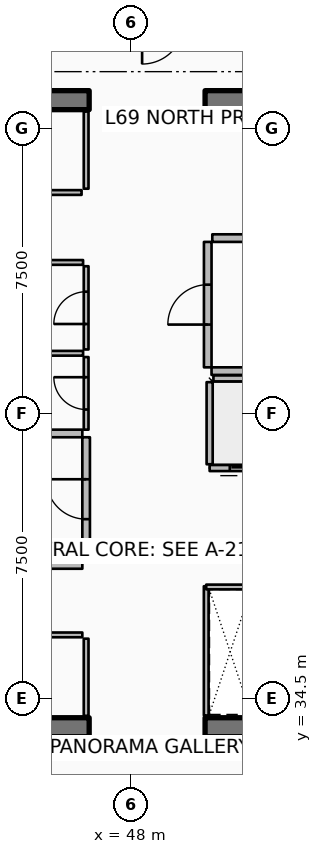
"""IFC4 building model, lengths in metres.
Left out: names, types, materials, properties, quantities, classifications, styles, units other than length and angle.
Written with IfcOpenShell. Run it as: python <this file> out.ifc"""

import sys

from ifc_helpers import new_model, si_unit, direction, frame, frame_2d, origin, place, context, subcontext, project, spatial, rectangle, extrude, element, fill, save


model = new_model("IFC4")
c1 = context("Model", 3, precision=1e-05, world=origin(), true_north=direction((0.0, 1.0)))
c2 = subcontext(c1, "Body", "Model", "MODEL_VIEW")
j1 = project(units=[si_unit("LENGTHUNIT", "METRE"), si_unit("PLANEANGLEUNIT", "RADIAN")], contexts=[c1])
p1 = place(None, origin())
s1 = spatial("IfcSite", under=j1, at=p1, CompositionType="ELEMENT")
p2 = place(p1, origin())
s2 = spatial("IfcBuilding", under=s1, at=p2, CompositionType="ELEMENT")
p3 = place(p2, frame((0.0, 0.0, 275.2)))
s3 = spatial("IfcBuildingStorey", under=s2, at=p3, CompositionType="ELEMENT", Elevation=275.2)
p4 = place(p3, frame((37.3, 33.75, 0.0), z_axis=(0.0, 0.0, 1.0), x_axis=(1.0, 0.0, 0.0)))
e1 = element("IfcWall", 1, at=p4, inside=s3, PredefinedType="SHEAR", context=c2, shape_type="SweptSolid", body=[
    extrude(rectangle(XDim=9.6, YDim=0.5, at=frame_2d((4.8, 0.0))), origin(), (0.0, 0.0, 1.0), 3.85),
])
p5 = place(p3, frame((49.95, 33.75, 0.0), z_axis=(0.0, 0.0, 1.0), x_axis=(1.0, 0.0, 0.0)))
e2 = element("IfcWall", 2, at=p5, inside=s3, PredefinedType="SHEAR", context=c2, shape_type="SweptSolid", body=[
    extrude(rectangle(XDim=9.6, YDim=0.5, at=frame_2d((4.8, 0.0))), origin(), (0.0, 0.0, 1.0), 3.85),
])
p6 = place(p3, frame((37.3, 50.25, 0.0), z_axis=(0.0, 0.0, 1.0), x_axis=(1.0, 0.0, 0.0)))
e3 = element("IfcWall", 3, at=p6, inside=s3, PredefinedType="SHEAR", context=c2, shape_type="SweptSolid", body=[
    extrude(rectangle(XDim=9.6, YDim=0.5, at=frame_2d((4.8, 0.0))), origin(), (0.0, 0.0, 1.0), 3.85),
])
p7 = place(p3, frame((49.95, 50.25, 0.0), z_axis=(0.0, 0.0, 1.0), x_axis=(1.0, 0.0, 0.0)))
e4 = element("IfcWall", 4, at=p7, inside=s3, PredefinedType="SHEAR", context=c2, shape_type="SweptSolid", body=[
    extrude(rectangle(XDim=9.6, YDim=0.5, at=frame_2d((4.8, 0.0))), origin(), (0.0, 0.0, 1.0), 3.85),
])
p8 = place(p3, frame((52.23, 40.57, 0.0), z_axis=(0.0, 0.0, 1.0), x_axis=(-1.0, 0.0, 0.0)))
e5 = element("IfcWall", 5, at=p8, inside=s3, PredefinedType="PARTITIONING", context=c2, shape_type="SweptSolid", body=[
    extrude(rectangle(XDim=2.16, YDim=0.16, at=frame_2d((1.08, 0.0))), origin(), (0.0, 0.0, 1.0), 3.59),
])
p9 = place(p8, frame((0.53, 0.0, 0.0)))
e6 = element("IfcOpeningElement", 6, at=p9, cuts=e5, PredefinedType="OPENING", context=c2, shape_type="SweptSolid", body=[
    extrude(rectangle(XDim=1.1, YDim=2.1, at=frame_2d((0.55, 1.05))), frame((0.0, 0.09, 0.0), z_axis=(0.0, -1.0, 0.0), x_axis=(1.0, 0.0, 0.0)), (0.0, 0.0, 1.0), 0.18),
])
p10 = place(p3, frame((50.07, 40.67, 0.0), z_axis=(0.0, 0.0, 1.0), x_axis=(0.0, 1.0, 0.0)))
e7 = element("IfcWall", 7, at=p10, inside=s3, PredefinedType="PARTITIONING", context=c2, shape_type="SweptSolid", body=[
    extrude(rectangle(XDim=2.16, YDim=0.16, at=frame_2d((1.08, 0.0))), origin(), (0.0, 0.0, 1.0), 3.59),
])
p11 = place(p3, frame((50.17, 42.93, 0.0), z_axis=(0.0, 0.0, 1.0), x_axis=(1.0, 0.0, 0.0)))
e8 = element("IfcWall", 8, at=p11, inside=s3, PredefinedType="PARTITIONING", context=c2, shape_type="SweptSolid", body=[
    extrude(rectangle(XDim=1.96, YDim=0.16, at=frame_2d((0.98, 0.0))), origin(), (0.0, 0.0, 1.0), 3.59),
])
p12 = place(p3, frame((46.82, 34.05, 0.0), z_axis=(0.0, 0.0, 1.0), x_axis=(0.0, 1.0, 0.0)))
e9 = element("IfcWall", 9, at=p12, inside=s3, PredefinedType="PARTITIONING", context=c2, shape_type="SweptSolid", body=[
    extrude(rectangle(XDim=2.03, YDim=0.125, at=frame_2d((1.015, 0.0))), origin(), (0.0, 0.0, 1.0), 3.03),
])
p13 = place(p3, frame((42.6, 36.18, 0.0), z_axis=(0.0, 0.0, 1.0), x_axis=(1.0, 0.0, 0.0)))
e10 = element("IfcWall", 10, at=p13, inside=s3, PredefinedType="PARTITIONING", context=c2, shape_type="SweptSolid", body=[
    extrude(rectangle(XDim=4.12, YDim=0.125, at=frame_2d((2.06, 0.0))), origin(), (0.0, 0.0, 1.0), 3.03),
])
p14 = place(p13, frame((1.635, 0.0, 0.0)))
e11 = element("IfcOpeningElement", 11, at=p14, cuts=e10, PredefinedType="OPENING", context=c2, shape_type="SweptSolid", body=[
    extrude(rectangle(XDim=0.85, YDim=2.06, at=frame_2d((0.425, 1.03))), frame((0.0, 0.073, 0.0), z_axis=(0.0, -1.0, 0.0), x_axis=(1.0, 0.0, 0.0)), (0.0, 0.0, 1.0), 0.145),
])
p15 = place(p3, frame((46.82, 47.92, 0.0), z_axis=(0.0, 0.0, 1.0), x_axis=(0.0, 1.0, 0.0)))
e12 = element("IfcWall", 12, at=p15, inside=s3, PredefinedType="PARTITIONING", context=c2, shape_type="SweptSolid", body=[
    extrude(rectangle(XDim=2.03, YDim=0.125, at=frame_2d((1.015, 0.0))), origin(), (0.0, 0.0, 1.0), 3.03),
])
p16 = place(p3, frame((37.92, 47.82, 0.0), z_axis=(0.0, 0.0, 1.0), x_axis=(1.0, 0.0, 0.0)))
e13 = element("IfcWall", 13, at=p16, inside=s3, PredefinedType="PARTITIONING", context=c2, shape_type="SweptSolid", body=[
    extrude(rectangle(XDim=8.78, YDim=0.125, at=frame_2d((4.39, 0.0))), origin(), (0.0, 0.0, 1.0), 3.03),
])
p17 = place(p16, frame((3.965, 0.0, 0.0)))
e14 = element("IfcOpeningElement", 14, at=p17, cuts=e13, PredefinedType="OPENING", context=c2, shape_type="SweptSolid", body=[
    extrude(rectangle(XDim=0.85, YDim=2.06, at=frame_2d((0.425, 1.03))), frame((0.0, 0.073, 0.0), z_axis=(0.0, -1.0, 0.0), x_axis=(1.0, 0.0, 0.0)), (0.0, 0.0, 1.0), 0.145),
])
p18 = place(p3, frame((41.35, 38.02, 0.0), z_axis=(0.0, 0.0, 1.0), x_axis=(1.0, 0.0, 0.0)))
e15 = element("IfcWall", 15, at=p18, inside=s3, PredefinedType="PARTITIONING", context=c2, shape_type="SweptSolid", body=[
    extrude(rectangle(XDim=5.37, YDim=0.2, at=frame_2d((2.685, 0.0))), origin(), (0.0, 0.0, 1.0), 3.59),
])
p19 = place(p3, frame((43.92, 41.48, 0.0), z_axis=(0.0, 0.0, 1.0), x_axis=(1.0, 0.0, 0.0)))
e16 = element("IfcWall", 16, at=p19, inside=s3, PredefinedType="PARTITIONING", context=c2, shape_type="SweptSolid", body=[
    extrude(rectangle(XDim=2.8, YDim=0.2, at=frame_2d((1.4, 0.0))), origin(), (0.0, 0.0, 1.0), 3.59),
])
p20 = place(p3, frame((46.82, 38.12, 0.0), z_axis=(0.0, 0.0, 1.0), x_axis=(0.0, 1.0, 0.0)))
e17 = element("IfcWall", 17, at=p20, inside=s3, PredefinedType="PARTITIONING", context=c2, shape_type="SweptSolid", body=[
    extrude(rectangle(XDim=3.26, YDim=0.2, at=frame_2d((1.63, 0.0))), origin(), (0.0, 0.0, 1.0), 3.59),
])
p21 = place(p20, frame((1.105, 0.0, 0.0)))
e18 = element("IfcOpeningElement", 18, at=p21, cuts=e17, PredefinedType="OPENING", context=c2, shape_type="SweptSolid", body=[
    extrude(rectangle(XDim=1.05, YDim=2.1, at=frame_2d((0.525, 1.05))), frame((0.0, 0.11, 0.0), z_axis=(0.0, -1.0, 0.0), x_axis=(1.0, 0.0, 0.0)), (0.0, 0.0, 1.0), 0.22),
])
p22 = place(p3, frame((50.12, 43.12, 0.0), z_axis=(0.0, 0.0, 1.0), x_axis=(1.0, 0.0, 0.0)))
e19 = element("IfcWall", 19, at=p22, inside=s3, PredefinedType="PARTITIONING", context=c2, shape_type="SweptSolid", body=[
    extrude(rectangle(XDim=8.88, YDim=0.2, at=frame_2d((4.44, 0.0))), origin(), (0.0, 0.0, 1.0), 3.59),
])
p23 = place(p3, frame((50.14, 46.62, 0.0), z_axis=(0.0, 0.0, 1.0), x_axis=(1.0, 0.0, 0.0)))
e20 = element("IfcWall", 20, at=p23, inside=s3, PredefinedType="PARTITIONING", context=c2, shape_type="SweptSolid", body=[
    extrude(rectangle(XDim=1.02, YDim=0.2, at=frame_2d((0.51, 0.0))), origin(), (0.0, 0.0, 1.0), 3.59),
])
p24 = place(p3, frame((50.02, 43.22, 0.0), z_axis=(0.0, 0.0, 1.0), x_axis=(0.0, 1.0, 0.0)))
e21 = element("IfcWall", 21, at=p24, inside=s3, PredefinedType="PARTITIONING", context=c2, shape_type="SweptSolid", body=[
    extrude(rectangle(XDim=3.3, YDim=0.2, at=frame_2d((1.65, 0.0))), origin(), (0.0, 0.0, 1.0), 3.59),
])
p25 = place(p24, frame((1.125, 0.0, 0.0)))
e22 = element("IfcOpeningElement", 22, at=p25, cuts=e21, PredefinedType="OPENING", context=c2, shape_type="SweptSolid", body=[
    extrude(rectangle(XDim=1.05, YDim=2.1, at=frame_2d((0.525, 1.05))), frame((0.0, 0.11, 0.0), z_axis=(0.0, -1.0, 0.0), x_axis=(1.0, 0.0, 0.0)), (0.0, 0.0, 1.0), 0.22),
])
p26 = place(p3, frame((49.98, 34.06, 0.0), z_axis=(0.0, 0.0, 1.0), x_axis=(0.0, 1.0, 0.0)))
e23 = element("IfcWall", 23, at=p26, inside=s3, PredefinedType="PARTITIONING", context=c2, shape_type="SweptSolid", body=[
    extrude(rectangle(XDim=3.4, YDim=0.125, at=frame_2d((1.7, 0.0))), origin(), (0.0, 0.0, 1.0), 3.03),
])
p27 = place(p3, frame((49.98, 37.44, 0.0), z_axis=(0.0, 0.0, 1.0), x_axis=(1.0, 0.0, 0.0)))
e24 = element("IfcWall", 24, at=p27, inside=s3, PredefinedType="PARTITIONING", context=c2, shape_type="SweptSolid", body=[
    extrude(rectangle(XDim=1.26, YDim=0.125, at=frame_2d((0.63, 0.0))), origin(), (0.0, 0.0, 1.0), 3.03),
])
p28 = place(p3, frame((44.03, 43.59, 0.0), z_axis=(0.0, 0.0, 1.0), x_axis=(1.0, 0.0, 0.0)))
e25 = element("IfcWall", 25, at=p28, inside=s3, PredefinedType="PARTITIONING", context=c2, shape_type="SweptSolid", body=[
    extrude(rectangle(XDim=2.71, YDim=0.125, at=frame_2d((1.355, 0.0))), origin(), (0.0, 0.0, 1.0), 3.03),
])
p29 = place(p3, frame((46.82, 41.58, 0.0), z_axis=(0.0, 0.0, 1.0), x_axis=(0.0, 1.0, 0.0)))
e26 = element("IfcWall", 26, at=p29, inside=s3, PredefinedType="PARTITIONING", context=c2, shape_type="SweptSolid", body=[
    extrude(rectangle(XDim=1.91, YDim=0.125, at=frame_2d((0.955, 0.0))), origin(), (0.0, 0.0, 1.0), 3.03),
])
p30 = place(p29, frame((0.53, 0.0, 0.0)))
e27 = element("IfcOpeningElement", 27, at=p30, cuts=e26, PredefinedType="OPENING", context=c2, shape_type="SweptSolid", body=[
    extrude(rectangle(XDim=0.85, YDim=2.06, at=frame_2d((0.425, 1.03))), frame((0.0, 0.073, 0.0), z_axis=(0.0, -1.0, 0.0), x_axis=(1.0, 0.0, 0.0)), (0.0, 0.0, 1.0), 0.145),
])
p31 = place(p3, frame((46.82, 43.69, 0.0), z_axis=(0.0, 0.0, 1.0), x_axis=(0.0, 1.0, 0.0)))
e28 = element("IfcWall", 28, at=p31, inside=s3, PredefinedType="PARTITIONING", context=c2, shape_type="SweptSolid", body=[
    extrude(rectangle(XDim=2.19, YDim=0.125, at=frame_2d((1.095, 0.0))), origin(), (0.0, 0.0, 1.0), 3.03),
])
p32 = place(p31, frame((0.67, 0.0, 0.0)))
e29 = element("IfcOpeningElement", 29, at=p32, cuts=e28, PredefinedType="OPENING", context=c2, shape_type="SweptSolid", body=[
    extrude(rectangle(XDim=0.85, YDim=2.06, at=frame_2d((0.425, 1.03))), frame((0.0, 0.073, 0.0), z_axis=(0.0, -1.0, 0.0), x_axis=(1.0, 0.0, 0.0)), (0.0, 0.0, 1.0), 0.145),
])
p33 = place(p3, frame((45.48, 45.98, 0.0), z_axis=(0.0, 0.0, 1.0), x_axis=(1.0, 0.0, 0.0)))
e30 = element("IfcWall", 30, at=p33, inside=s3, PredefinedType="PARTITIONING", context=c2, shape_type="SweptSolid", body=[
    extrude(rectangle(XDim=1.26, YDim=0.125, at=frame_2d((0.63, 0.0))), origin(), (0.0, 0.0, 1.0), 3.03),
])
p34 = place(p9, origin())
e31 = element("IfcDoor", 31, at=p34, inside=s3, OperationType="DOUBLE_DOOR_SLIDING", PredefinedType="DOOR", context=c2, shape_type="SweptSolid", body=[
    extrude(rectangle(XDim=1.1, YDim=2.1, at=frame_2d((0.55, 1.05))), frame((0.0, 0.025, 0.0), z_axis=(0.0, -1.0, 0.0), x_axis=(1.0, 0.0, 0.0)), (0.0, 0.0, 1.0), 0.05),
])
fill(e6, e31)
p35 = place(p21, origin())
e32 = element("IfcDoor", 32, at=p35, inside=s3, OperationType="SINGLE_SWING_RIGHT", PredefinedType="DOOR", context=c2, shape_type="SweptSolid", body=[
    extrude(rectangle(XDim=1.05, YDim=2.1, at=frame_2d((0.525, 1.05))), frame((0.0, 0.025, 0.0), z_axis=(0.0, -1.0, 0.0), x_axis=(1.0, 0.0, 0.0)), (0.0, 0.0, 1.0), 0.05),
])
fill(e18, e32)
p36 = place(p25, origin())
e33 = element("IfcDoor", 33, at=p36, inside=s3, OperationType="SINGLE_SWING_LEFT", PredefinedType="DOOR", context=c2, shape_type="SweptSolid", body=[
    extrude(rectangle(XDim=1.05, YDim=2.1, at=frame_2d((0.525, 1.05))), frame((0.0, 0.025, 0.0), z_axis=(0.0, -1.0, 0.0), x_axis=(1.0, 0.0, 0.0)), (0.0, 0.0, 1.0), 0.05),
])
fill(e22, e33)
p37 = place(p30, origin())
e34 = element("IfcDoor", 34, at=p37, inside=s3, OperationType="SINGLE_SWING_RIGHT", PredefinedType="DOOR", context=c2, shape_type="SweptSolid", body=[
    extrude(rectangle(XDim=0.85, YDim=2.06, at=frame_2d((0.425, 1.03))), frame((0.0, 0.025, 0.0), z_axis=(0.0, -1.0, 0.0), x_axis=(1.0, 0.0, 0.0)), (0.0, 0.0, 1.0), 0.05),
])
fill(e27, e34)
p38 = place(p32, origin())
e35 = element("IfcDoor", 35, at=p38, inside=s3, OperationType="SINGLE_SWING_LEFT", PredefinedType="DOOR", context=c2, shape_type="SweptSolid", body=[
    extrude(rectangle(XDim=0.85, YDim=2.06, at=frame_2d((0.425, 1.03))), frame((0.0, 0.025, 0.0), z_axis=(0.0, -1.0, 0.0), x_axis=(1.0, 0.0, 0.0)), (0.0, 0.0, 1.0), 0.05),
])
fill(e29, e35)
save(model, sys.argv[1])
